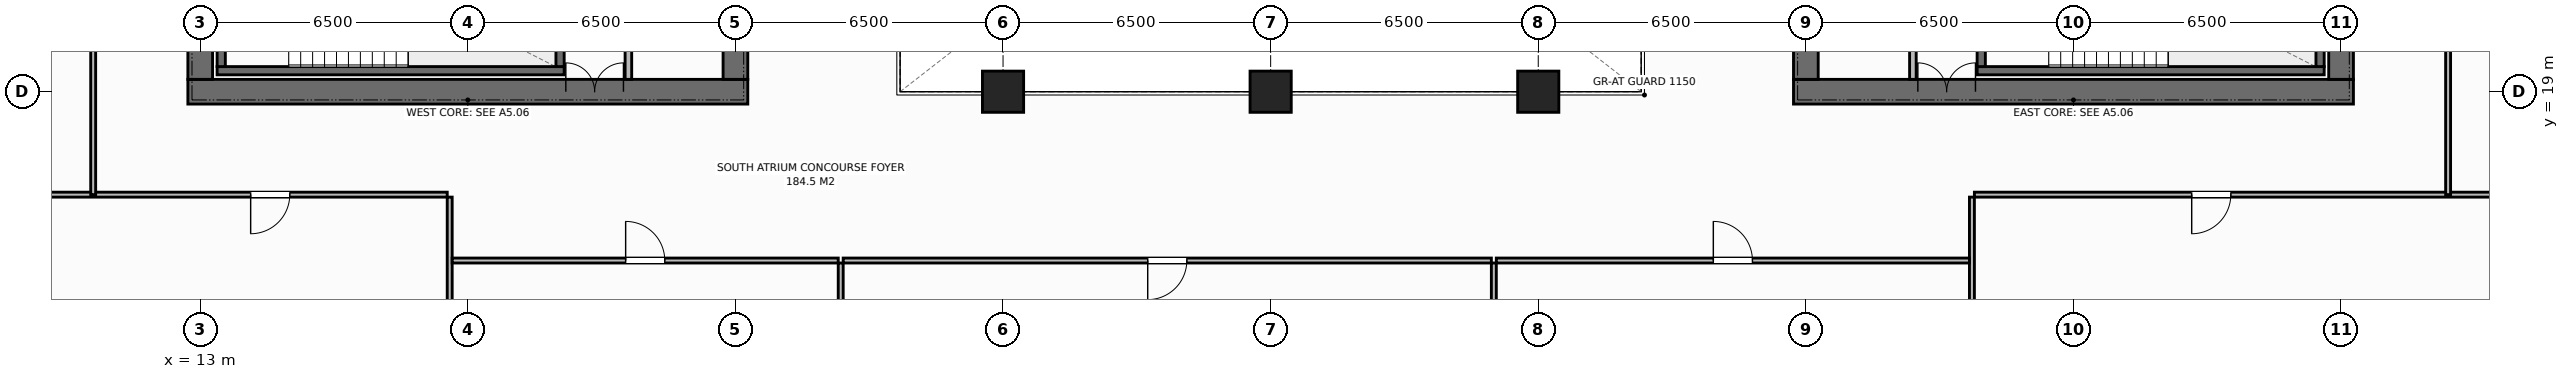
"""IFC4 building model, lengths in metres.
Left out: names, types, materials, properties, quantities, classifications, styles, units other than length and angle.
Written with IfcOpenShell. Run it as: python <this file> out.ifc"""

import sys

from ifc_helpers import new_model, si_unit, direction, frame, frame_2d, origin, origin_2d, place, context, subcontext, project, spatial, rectangle, extrude, element, fill, save


model = new_model("IFC4")
c1 = context("Model", 3, precision=1e-05, world=origin(), true_north=direction((0.0, 1.0)))
c2 = subcontext(c1, "Body", "Model", "MODEL_VIEW")
j1 = project(units=[si_unit("LENGTHUNIT", "METRE"), si_unit("PLANEANGLEUNIT", "RADIAN")], contexts=[c1])
p1 = place(None, origin())
s1 = spatial("IfcSite", under=j1, at=p1, CompositionType="ELEMENT")
p2 = place(p1, origin())
s2 = spatial("IfcBuilding", under=s1, at=p2, CompositionType="ELEMENT")
p3 = place(p2, frame((0.0, 0.0, 144.2)))
s3 = spatial("IfcBuildingStorey", under=s2, at=p3, CompositionType="ELEMENT", Elevation=144.2)
p4 = place(p3, frame((12.7, 19.0, 0.0), z_axis=(0.0, 0.0, 1.0), x_axis=(1.0, 0.0, 0.0)))
e1 = element("IfcWall", 1, at=p4, inside=s3, PredefinedType="SHEAR", context=c2, shape_type="SweptSolid", body=[
    extrude(rectangle(XDim=13.6, YDim=0.6, at=frame_2d((6.8, 0.0))), origin(), (0.0, 0.0, 1.0), 3.8),
])
p5 = place(p4, frame((9.18, 0.0, 0.0)))
e2 = element("IfcOpeningElement", 2, at=p5, cuts=e1, PredefinedType="OPENING", context=c2, shape_type="SweptSolid", body=[
    extrude(rectangle(XDim=1.4, YDim=2.2, at=frame_2d((0.7, 1.1))), frame((0.0, 0.31, 0.0), z_axis=(0.0, -1.0, 0.0), x_axis=(1.0, 0.0, 0.0)), (0.0, 0.0, 1.0), 0.62),
])
p6 = place(p3, frame((13.0, 19.3, 0.0), z_axis=(0.0, 0.0, 1.0), x_axis=(0.0, 1.0, 0.0)))
e3 = element("IfcWall", 3, at=p6, inside=s3, PredefinedType="SHEAR", context=c2, shape_type="SweptSolid", body=[
    extrude(rectangle(XDim=13.4, YDim=0.6, at=frame_2d((6.7, 0.0))), origin(), (0.0, 0.0, 1.0), 3.8),
])
p7 = place(p6, frame((4.75, 0.0, 0.0)))
e4 = element("IfcOpeningElement", 4, at=p7, cuts=e3, PredefinedType="OPENING", context=c2, shape_type="SweptSolid", body=[
    extrude(rectangle(XDim=1.4, YDim=2.2, at=frame_2d((0.7, 1.1))), frame((0.0, 0.31, 0.0), z_axis=(0.0, -1.0, 0.0), x_axis=(1.0, 0.0, 0.0)), (0.0, 0.0, 1.0), 0.62),
])
p8 = place(p3, frame((26.0, 19.3, 0.0), z_axis=(0.0, 0.0, 1.0), x_axis=(0.0, 1.0, 0.0)))
e5 = element("IfcWall", 5, at=p8, inside=s3, PredefinedType="SHEAR", context=c2, shape_type="SweptSolid", body=[
    extrude(rectangle(XDim=13.4, YDim=0.6, at=frame_2d((6.7, 0.0))), origin(), (0.0, 0.0, 1.0), 3.8),
])
p9 = place(p3, frame((51.7, 19.0, 0.0), z_axis=(0.0, 0.0, 1.0), x_axis=(1.0, 0.0, 0.0)))
e6 = element("IfcWall", 6, at=p9, inside=s3, PredefinedType="SHEAR", context=c2, shape_type="SweptSolid", body=[
    extrude(rectangle(XDim=13.6, YDim=0.6, at=frame_2d((6.8, 0.0))), origin(), (0.0, 0.0, 1.0), 3.8),
])
p10 = place(p9, frame((3.02, 0.0, 0.0)))
e7 = element("IfcOpeningElement", 7, at=p10, cuts=e6, PredefinedType="OPENING", context=c2, shape_type="SweptSolid", body=[
    extrude(rectangle(XDim=1.4, YDim=2.2, at=frame_2d((0.7, 1.1))), frame((0.0, 0.31, 0.0), z_axis=(0.0, -1.0, 0.0), x_axis=(1.0, 0.0, 0.0)), (0.0, 0.0, 1.0), 0.62),
])
p11 = place(p3, frame((52.0, 19.3, 0.0), z_axis=(0.0, 0.0, 1.0), x_axis=(0.0, 1.0, 0.0)))
e8 = element("IfcWall", 8, at=p11, inside=s3, PredefinedType="SHEAR", context=c2, shape_type="SweptSolid", body=[
    extrude(rectangle(XDim=13.4, YDim=0.6, at=frame_2d((6.7, 0.0))), origin(), (0.0, 0.0, 1.0), 3.8),
])
p12 = place(p3, frame((65.0, 19.3, 0.0), z_axis=(0.0, 0.0, 1.0), x_axis=(0.0, 1.0, 0.0)))
e9 = element("IfcWall", 9, at=p12, inside=s3, PredefinedType="SHEAR", context=c2, shape_type="SweptSolid", body=[
    extrude(rectangle(XDim=13.4, YDim=0.6, at=frame_2d((6.7, 0.0))), origin(), (0.0, 0.0, 1.0), 3.8),
])
p13 = place(p12, frame((8.15, 0.0, 0.0)))
e10 = element("IfcOpeningElement", 10, at=p13, cuts=e9, PredefinedType="OPENING", context=c2, shape_type="SweptSolid", body=[
    extrude(rectangle(XDim=1.3, YDim=2.2, at=frame_2d((0.65, 1.1))), frame((0.0, 0.31, 0.0), z_axis=(0.0, -1.0, 0.0), x_axis=(1.0, 0.0, 0.0)), (0.0, 0.0, 1.0), 0.62),
])
p14 = place(p3, frame((13.41, 19.51, 0.0), z_axis=(0.0, 0.0, 1.0), x_axis=(1.0, 0.0, 0.0)))
e11 = element("IfcWall", 11, at=p14, inside=s3, PredefinedType="SHEAR", context=c2, shape_type="SweptSolid", body=[
    extrude(rectangle(XDim=8.43, YDim=0.2, at=frame_2d((4.215, 0.0))), origin(), (0.0, 0.0, 1.0), 3.8),
])
for number, where, z_axis, x_axis in (
    (12, (13.51, 19.61, 0.0), (0.0, 0.0, 1.0), (0.0, 1.0, 0.0)),
    (13, (21.74, 19.61, 0.0), (0.0, 0.0, 1.0), (0.0, 1.0, 0.0)),
):
    element("IfcWall", number, at=place(p3, frame(where, z_axis=z_axis, x_axis=x_axis)), inside=s3, PredefinedType="SHEAR", context=c2, shape_type="SweptSolid", body=[
        extrude(rectangle(XDim=3.28, YDim=0.2, at=frame_2d((1.64, 0.0))), origin(), (0.0, 0.0, 1.0), 3.8),
    ])
p15 = place(p3, frame((56.16, 19.51, 0.0), z_axis=(0.0, 0.0, 1.0), x_axis=(1.0, 0.0, 0.0)))
e14 = element("IfcWall", 14, at=p15, inside=s3, PredefinedType="SHEAR", context=c2, shape_type="SweptSolid", body=[
    extrude(rectangle(XDim=8.43, YDim=0.2, at=frame_2d((4.215, 0.0))), origin(), (0.0, 0.0, 1.0), 3.8),
])
for number, where, z_axis, x_axis in (
    (15, (56.26, 19.61, 0.0), (0.0, 0.0, 1.0), (0.0, 1.0, 0.0)),
    (16, (64.49, 19.61, 0.0), (0.0, 0.0, 1.0), (0.0, 1.0, 0.0)),
):
    element("IfcWall", number, at=place(p3, frame(where, z_axis=z_axis, x_axis=x_axis)), inside=s3, PredefinedType="SHEAR", context=c2, shape_type="SweptSolid", body=[
        extrude(rectangle(XDim=3.28, YDim=0.2, at=frame_2d((1.64, 0.0))), origin(), (0.0, 0.0, 1.0), 3.8),
    ])
for number, where, z_axis, x_axis in (
    (17, (32.5, 19.0, 0.0), (0.0, 0.0, 1.0), (1.0, 0.0, 0.0)),
    (18, (39.0, 19.0, 0.0), (0.0, 0.0, 1.0), (1.0, 0.0, 0.0)),
    (19, (45.5, 19.0, 0.0), (0.0, 0.0, 1.0), (1.0, 0.0, 0.0)),
):
    element("IfcColumn", number, at=place(p3, frame(where, z_axis=z_axis, x_axis=x_axis)), inside=s3, PredefinedType="COLUMN", context=c2, shape_type="SweptSolid", body=[
        extrude(rectangle(XDim=1.0, YDim=1.0, at=origin_2d()), origin(), (0.0, 0.0, 1.0), 3.8),
    ])
p16 = place(p3, frame((23.4, 19.3, 0.0), z_axis=(0.0, 0.0, 1.0), x_axis=(0.0, 1.0, 0.0)))
e20 = element("IfcWall", 20, at=p16, inside=s3, PredefinedType="STANDARD", context=c2, shape_type="SweptSolid", body=[
    extrude(rectangle(XDim=13.4, YDim=0.16, at=frame_2d((6.7, 0.0))), origin(), (0.0, 0.0, 1.0), 3.572),
])
p17 = place(p16, frame((1.7, 0.0, 0.0)))
e21 = element("IfcOpeningElement", 21, at=p17, cuts=e20, PredefinedType="OPENING", context=c2, shape_type="SweptSolid", body=[
    extrude(rectangle(XDim=0.95, YDim=2.15, at=frame_2d((0.475, 1.075))), frame((0.0, 0.09, 0.0), z_axis=(0.0, -1.0, 0.0), x_axis=(1.0, 0.0, 0.0)), (0.0, 0.0, 1.0), 0.18),
])
p18 = place(p16, frame((5.0, 0.0, 0.0)))
e22 = element("IfcOpeningElement", 22, at=p18, cuts=e20, PredefinedType="OPENING", context=c2, shape_type="SweptSolid", body=[
    extrude(rectangle(XDim=1.1, YDim=2.2, at=frame_2d((0.55, 1.1))), frame((0.0, 0.09, 0.0), z_axis=(0.0, -1.0, 0.0), x_axis=(1.0, 0.0, 0.0)), (0.0, 0.0, 1.0), 0.18),
])
p19 = place(p16, frame((7.15, 0.0, 0.0)))
e23 = element("IfcOpeningElement", 23, at=p19, cuts=e20, PredefinedType="OPENING", context=c2, shape_type="SweptSolid", body=[
    extrude(rectangle(XDim=1.1, YDim=2.2, at=frame_2d((0.55, 1.1))), frame((0.0, 0.09, 0.0), z_axis=(0.0, -1.0, 0.0), x_axis=(1.0, 0.0, 0.0)), (0.0, 0.0, 1.0), 0.18),
])
p20 = place(p16, frame((9.3, 0.0, 0.0)))
e24 = element("IfcOpeningElement", 24, at=p20, cuts=e20, PredefinedType="OPENING", context=c2, shape_type="SweptSolid", body=[
    extrude(rectangle(XDim=1.1, YDim=2.2, at=frame_2d((0.55, 1.1))), frame((0.0, 0.09, 0.0), z_axis=(0.0, -1.0, 0.0), x_axis=(1.0, 0.0, 0.0)), (0.0, 0.0, 1.0), 0.18),
])
p21 = place(p16, frame((11.5, 0.0, 0.0)))
e25 = element("IfcOpeningElement", 25, at=p21, cuts=e20, PredefinedType="OPENING", context=c2, shape_type="SweptSolid", body=[
    extrude(rectangle(XDim=1.1, YDim=2.2, at=frame_2d((0.55, 1.1))), frame((0.0, 0.09, 0.0), z_axis=(0.0, -1.0, 0.0), x_axis=(1.0, 0.0, 0.0)), (0.0, 0.0, 1.0), 0.18),
])
p22 = place(p3, frame((54.6, 19.3, 0.0), z_axis=(0.0, 0.0, 1.0), x_axis=(0.0, 1.0, 0.0)))
e26 = element("IfcWall", 26, at=p22, inside=s3, PredefinedType="STANDARD", context=c2, shape_type="SweptSolid", body=[
    extrude(rectangle(XDim=13.4, YDim=0.16, at=frame_2d((6.7, 0.0))), origin(), (0.0, 0.0, 1.0), 3.572),
])
p23 = place(p22, frame((1.7, 0.0, 0.0)))
e27 = element("IfcOpeningElement", 27, at=p23, cuts=e26, PredefinedType="OPENING", context=c2, shape_type="SweptSolid", body=[
    extrude(rectangle(XDim=0.95, YDim=2.15, at=frame_2d((0.475, 1.075))), frame((0.0, 0.09, 0.0), z_axis=(0.0, -1.0, 0.0), x_axis=(1.0, 0.0, 0.0)), (0.0, 0.0, 1.0), 0.18),
])
p24 = place(p22, frame((5.0, 0.0, 0.0)))
e28 = element("IfcOpeningElement", 28, at=p24, cuts=e26, PredefinedType="OPENING", context=c2, shape_type="SweptSolid", body=[
    extrude(rectangle(XDim=1.1, YDim=2.2, at=frame_2d((0.55, 1.1))), frame((0.0, 0.09, 0.0), z_axis=(0.0, -1.0, 0.0), x_axis=(1.0, 0.0, 0.0)), (0.0, 0.0, 1.0), 0.18),
])
p25 = place(p22, frame((7.15, 0.0, 0.0)))
e29 = element("IfcOpeningElement", 29, at=p25, cuts=e26, PredefinedType="OPENING", context=c2, shape_type="SweptSolid", body=[
    extrude(rectangle(XDim=1.1, YDim=2.2, at=frame_2d((0.55, 1.1))), frame((0.0, 0.09, 0.0), z_axis=(0.0, -1.0, 0.0), x_axis=(1.0, 0.0, 0.0)), (0.0, 0.0, 1.0), 0.18),
])
p26 = place(p22, frame((9.3, 0.0, 0.0)))
e30 = element("IfcOpeningElement", 30, at=p26, cuts=e26, PredefinedType="OPENING", context=c2, shape_type="SweptSolid", body=[
    extrude(rectangle(XDim=1.1, YDim=2.2, at=frame_2d((0.55, 1.1))), frame((0.0, 0.09, 0.0), z_axis=(0.0, -1.0, 0.0), x_axis=(1.0, 0.0, 0.0)), (0.0, 0.0, 1.0), 0.18),
])
p27 = place(p22, frame((11.5, 0.0, 0.0)))
e31 = element("IfcOpeningElement", 31, at=p27, cuts=e26, PredefinedType="OPENING", context=c2, shape_type="SweptSolid", body=[
    extrude(rectangle(XDim=1.1, YDim=2.2, at=frame_2d((0.55, 1.1))), frame((0.0, 0.09, 0.0), z_axis=(0.0, -1.0, 0.0), x_axis=(1.0, 0.0, 0.0)), (0.0, 0.0, 1.0), 0.18),
])
p28 = place(p3, frame((19.06, 3.42, 0.0), z_axis=(0.0, 0.0, 1.0), x_axis=(0.0, 1.0, 0.0)))
e32 = element("IfcWall", 32, at=p28, inside=s3, PredefinedType="PARTITIONING", context=c2, shape_type="SweptSolid", body=[
    extrude(rectangle(XDim=13.02, YDim=0.12, at=frame_2d((6.51, 0.0))), origin(), (0.0, 0.0, 1.0), 3.572),
])
p29 = place(p3, frame((3.98, 16.5, 0.0), z_axis=(0.0, 0.0, 1.0), x_axis=(1.0, 0.0, 0.0)))
e33 = element("IfcWall", 33, at=p29, inside=s3, PredefinedType="PARTITIONING", context=c2, shape_type="SweptSolid", body=[
    extrude(rectangle(XDim=15.02, YDim=0.12, at=frame_2d((7.51, 0.0))), origin(), (0.0, 0.0, 1.0), 3.572),
])
p30 = place(p29, frame((10.245, 0.0, 0.0)))
e34 = element("IfcOpeningElement", 34, at=p30, cuts=e33, PredefinedType="OPENING", context=c2, shape_type="SweptSolid", body=[
    extrude(rectangle(XDim=0.95, YDim=2.15, at=frame_2d((0.475, 1.075))), frame((0.0, 0.07, 0.0), z_axis=(0.0, -1.0, 0.0), x_axis=(1.0, 0.0, 0.0)), (0.0, 0.0, 1.0), 0.14),
])
p31 = place(p3, frame((28.557, 3.42, 0.0), z_axis=(0.0, 0.0, 1.0), x_axis=(0.0, 1.0, 0.0)))
e35 = element("IfcWall", 35, at=p31, inside=s3, PredefinedType="PARTITIONING", context=c2, shape_type="SweptSolid", body=[
    extrude(rectangle(XDim=11.42, YDim=0.12, at=frame_2d((5.71, 0.0))), origin(), (0.0, 0.0, 1.0), 3.572),
])
p32 = place(p3, frame((19.12, 14.9, 0.0), z_axis=(0.0, 0.0, 1.0), x_axis=(1.0, 0.0, 0.0)))
e36 = element("IfcWall", 36, at=p32, inside=s3, PredefinedType="PARTITIONING", context=c2, shape_type="SweptSolid", body=[
    extrude(rectangle(XDim=9.377, YDim=0.12, at=frame_2d((4.689, 0.0))), origin(), (0.0, 0.0, 1.0), 3.572),
])
p33 = place(p32, frame((4.214, 0.0, 0.0)))
e37 = element("IfcOpeningElement", 37, at=p33, cuts=e36, PredefinedType="OPENING", context=c2, shape_type="SweptSolid", body=[
    extrude(rectangle(XDim=0.95, YDim=2.15, at=frame_2d((0.475, 1.075))), frame((0.0, 0.07, 0.0), z_axis=(0.0, -1.0, 0.0), x_axis=(1.0, 0.0, 0.0)), (0.0, 0.0, 1.0), 0.14),
])
p34 = place(p3, frame((44.421, 3.42, 0.0), z_axis=(0.0, 0.0, 1.0), x_axis=(0.0, 1.0, 0.0)))
e38 = element("IfcWall", 38, at=p34, inside=s3, PredefinedType="PARTITIONING", context=c2, shape_type="SweptSolid", body=[
    extrude(rectangle(XDim=11.42, YDim=0.12, at=frame_2d((5.71, 0.0))), origin(), (0.0, 0.0, 1.0), 3.572),
])
p35 = place(p3, frame((28.617, 14.9, 0.0), z_axis=(0.0, 0.0, 1.0), x_axis=(1.0, 0.0, 0.0)))
e39 = element("IfcWall", 39, at=p35, inside=s3, PredefinedType="PARTITIONING", context=c2, shape_type="SweptSolid", body=[
    extrude(rectangle(XDim=15.744, YDim=0.12, at=frame_2d((7.872, 0.0))), origin(), (0.0, 0.0, 1.0), 3.572),
])
p36 = place(p35, frame((7.397, 0.0, 0.0)))
e40 = element("IfcOpeningElement", 40, at=p36, cuts=e39, PredefinedType="OPENING", context=c2, shape_type="SweptSolid", body=[
    extrude(rectangle(XDim=0.95, YDim=2.15, at=frame_2d((0.475, 1.075))), frame((0.0, 0.07, 0.0), z_axis=(0.0, -1.0, 0.0), x_axis=(1.0, 0.0, 0.0)), (0.0, 0.0, 1.0), 0.14),
])
p37 = place(p3, frame((56.034, 3.42, 0.0), z_axis=(0.0, 0.0, 1.0), x_axis=(0.0, 1.0, 0.0)))
e41 = element("IfcWall", 41, at=p37, inside=s3, PredefinedType="PARTITIONING", context=c2, shape_type="SweptSolid", body=[
    extrude(rectangle(XDim=13.02, YDim=0.12, at=frame_2d((6.51, 0.0))), origin(), (0.0, 0.0, 1.0), 3.572),
])
p38 = place(p3, frame((44.481, 14.9, 0.0), z_axis=(0.0, 0.0, 1.0), x_axis=(1.0, 0.0, 0.0)))
e42 = element("IfcWall", 42, at=p38, inside=s3, PredefinedType="PARTITIONING", context=c2, shape_type="SweptSolid", body=[
    extrude(rectangle(XDim=11.492, YDim=0.12, at=frame_2d((5.746, 0.0))), origin(), (0.0, 0.0, 1.0), 3.572),
])
p39 = place(p38, frame((5.271, 0.0, 0.0)))
e43 = element("IfcOpeningElement", 43, at=p39, cuts=e42, PredefinedType="OPENING", context=c2, shape_type="SweptSolid", body=[
    extrude(rectangle(XDim=0.95, YDim=2.15, at=frame_2d((0.475, 1.075))), frame((0.0, 0.07, 0.0), z_axis=(0.0, -1.0, 0.0), x_axis=(1.0, 0.0, 0.0)), (0.0, 0.0, 1.0), 0.14),
])
p40 = place(p3, frame((56.094, 16.5, 0.0), z_axis=(0.0, 0.0, 1.0), x_axis=(1.0, 0.0, 0.0)))
e44 = element("IfcWall", 44, at=p40, inside=s3, PredefinedType="PARTITIONING", context=c2, shape_type="SweptSolid", body=[
    extrude(rectangle(XDim=17.926, YDim=0.12, at=frame_2d((8.963, 0.0))), origin(), (0.0, 0.0, 1.0), 3.572),
])
p41 = place(p40, frame((5.278, 0.0, 0.0)))
e45 = element("IfcOpeningElement", 45, at=p41, cuts=e44, PredefinedType="OPENING", context=c2, shape_type="SweptSolid", body=[
    extrude(rectangle(XDim=0.95, YDim=2.15, at=frame_2d((0.475, 1.075))), frame((0.0, 0.07, 0.0), z_axis=(0.0, -1.0, 0.0), x_axis=(1.0, 0.0, 0.0)), (0.0, 0.0, 1.0), 0.14),
])
p42 = place(p3, frame((10.4, 16.5, 0.0), z_axis=(0.0, 0.0, 1.0), x_axis=(0.0, 1.0, 0.0)))
e46 = element("IfcWall", 46, at=p42, inside=s3, PredefinedType="PARTITIONING", context=c2, shape_type="SweptSolid", body=[
    extrude(rectangle(XDim=9.5, YDim=0.12, at=frame_2d((4.75, 0.0))), origin(), (0.0, 0.0, 1.0), 3.572),
])
p43 = place(p42, frame((5.325, 0.0, 0.0)))
e47 = element("IfcOpeningElement", 47, at=p43, cuts=e46, PredefinedType="OPENING", context=c2, shape_type="SweptSolid", body=[
    extrude(rectangle(XDim=0.95, YDim=2.15, at=frame_2d((0.475, 1.075))), frame((0.0, 0.07, 0.0), z_axis=(0.0, -1.0, 0.0), x_axis=(1.0, 0.0, 0.0)), (0.0, 0.0, 1.0), 0.14),
])
p44 = place(p3, frame((67.6, 16.5, 0.0), z_axis=(0.0, 0.0, 1.0), x_axis=(0.0, 1.0, 0.0)))
e48 = element("IfcWall", 48, at=p44, inside=s3, PredefinedType="PARTITIONING", context=c2, shape_type="SweptSolid", body=[
    extrude(rectangle(XDim=19.0, YDim=0.12, at=frame_2d((9.5, 0.0))), origin(), (0.0, 0.0, 1.0), 3.572),
])
p45 = place(p44, frame((9.025, 0.0, 0.0)))
e49 = element("IfcOpeningElement", 49, at=p45, cuts=e48, PredefinedType="OPENING", context=c2, shape_type="SweptSolid", body=[
    extrude(rectangle(XDim=0.95, YDim=2.15, at=frame_2d((0.475, 1.075))), frame((0.0, 0.07, 0.0), z_axis=(0.0, -1.0, 0.0), x_axis=(1.0, 0.0, 0.0)), (0.0, 0.0, 1.0), 0.14),
])
p46 = place(p5, origin())
e50 = element("IfcDoor", 50, at=p46, inside=s3, OperationType="DOUBLE_DOOR_SINGLE_SWING", PredefinedType="DOOR", context=c2, shape_type="SweptSolid", body=[
    extrude(rectangle(XDim=1.4, YDim=2.2, at=frame_2d((0.7, 1.1))), frame((0.0, 0.075, 0.0), z_axis=(0.0, -1.0, 0.0), x_axis=(1.0, 0.0, 0.0)), (0.0, 0.0, 1.0), 0.05),
])
fill(e2, e50)
p47 = place(p10, origin())
e51 = element("IfcDoor", 51, at=p47, inside=s3, OperationType="DOUBLE_DOOR_SINGLE_SWING", PredefinedType="DOOR", context=c2, shape_type="SweptSolid", body=[
    extrude(rectangle(XDim=1.4, YDim=2.2, at=frame_2d((0.7, 1.1))), frame((0.0, 0.075, 0.0), z_axis=(0.0, -1.0, 0.0), x_axis=(1.0, 0.0, 0.0)), (0.0, 0.0, 1.0), 0.05),
])
fill(e7, e51)
p48 = place(p30, origin())
e52 = element("IfcDoor", 52, at=p48, inside=s3, OperationType="SINGLE_SWING_RIGHT", PredefinedType="DOOR", context=c2, shape_type="SweptSolid", body=[
    extrude(rectangle(XDim=0.95, YDim=2.15, at=frame_2d((0.475, 1.075))), frame((0.0, 0.025, 0.0), z_axis=(0.0, -1.0, 0.0), x_axis=(1.0, 0.0, 0.0)), (0.0, 0.0, 1.0), 0.05),
])
fill(e34, e52)
p49 = place(p33, origin())
e53 = element("IfcDoor", 53, at=p49, inside=s3, OperationType="SINGLE_SWING_LEFT", PredefinedType="DOOR", context=c2, shape_type="SweptSolid", body=[
    extrude(rectangle(XDim=0.95, YDim=2.15, at=frame_2d((0.475, 1.075))), frame((0.0, 0.025, 0.0), z_axis=(0.0, -1.0, 0.0), x_axis=(1.0, 0.0, 0.0)), (0.0, 0.0, 1.0), 0.05),
])
fill(e37, e53)
p50 = place(p36, origin())
e54 = element("IfcDoor", 54, at=p50, inside=s3, OperationType="SINGLE_SWING_RIGHT", PredefinedType="DOOR", context=c2, shape_type="SweptSolid", body=[
    extrude(rectangle(XDim=0.95, YDim=2.15, at=frame_2d((0.475, 1.075))), frame((0.0, 0.025, 0.0), z_axis=(0.0, -1.0, 0.0), x_axis=(1.0, 0.0, 0.0)), (0.0, 0.0, 1.0), 0.05),
])
fill(e40, e54)
p51 = place(p39, origin())
e55 = element("IfcDoor", 55, at=p51, inside=s3, OperationType="SINGLE_SWING_LEFT", PredefinedType="DOOR", context=c2, shape_type="SweptSolid", body=[
    extrude(rectangle(XDim=0.95, YDim=2.15, at=frame_2d((0.475, 1.075))), frame((0.0, 0.025, 0.0), z_axis=(0.0, -1.0, 0.0), x_axis=(1.0, 0.0, 0.0)), (0.0, 0.0, 1.0), 0.05),
])
fill(e43, e55)
p52 = place(p41, origin())
e56 = element("IfcDoor", 56, at=p52, inside=s3, OperationType="SINGLE_SWING_RIGHT", PredefinedType="DOOR", context=c2, shape_type="SweptSolid", body=[
    extrude(rectangle(XDim=0.95, YDim=2.15, at=frame_2d((0.475, 1.075))), frame((0.0, 0.025, 0.0), z_axis=(0.0, -1.0, 0.0), x_axis=(1.0, 0.0, 0.0)), (0.0, 0.0, 1.0), 0.05),
])
fill(e45, e56)
save(model, sys.argv[1])
